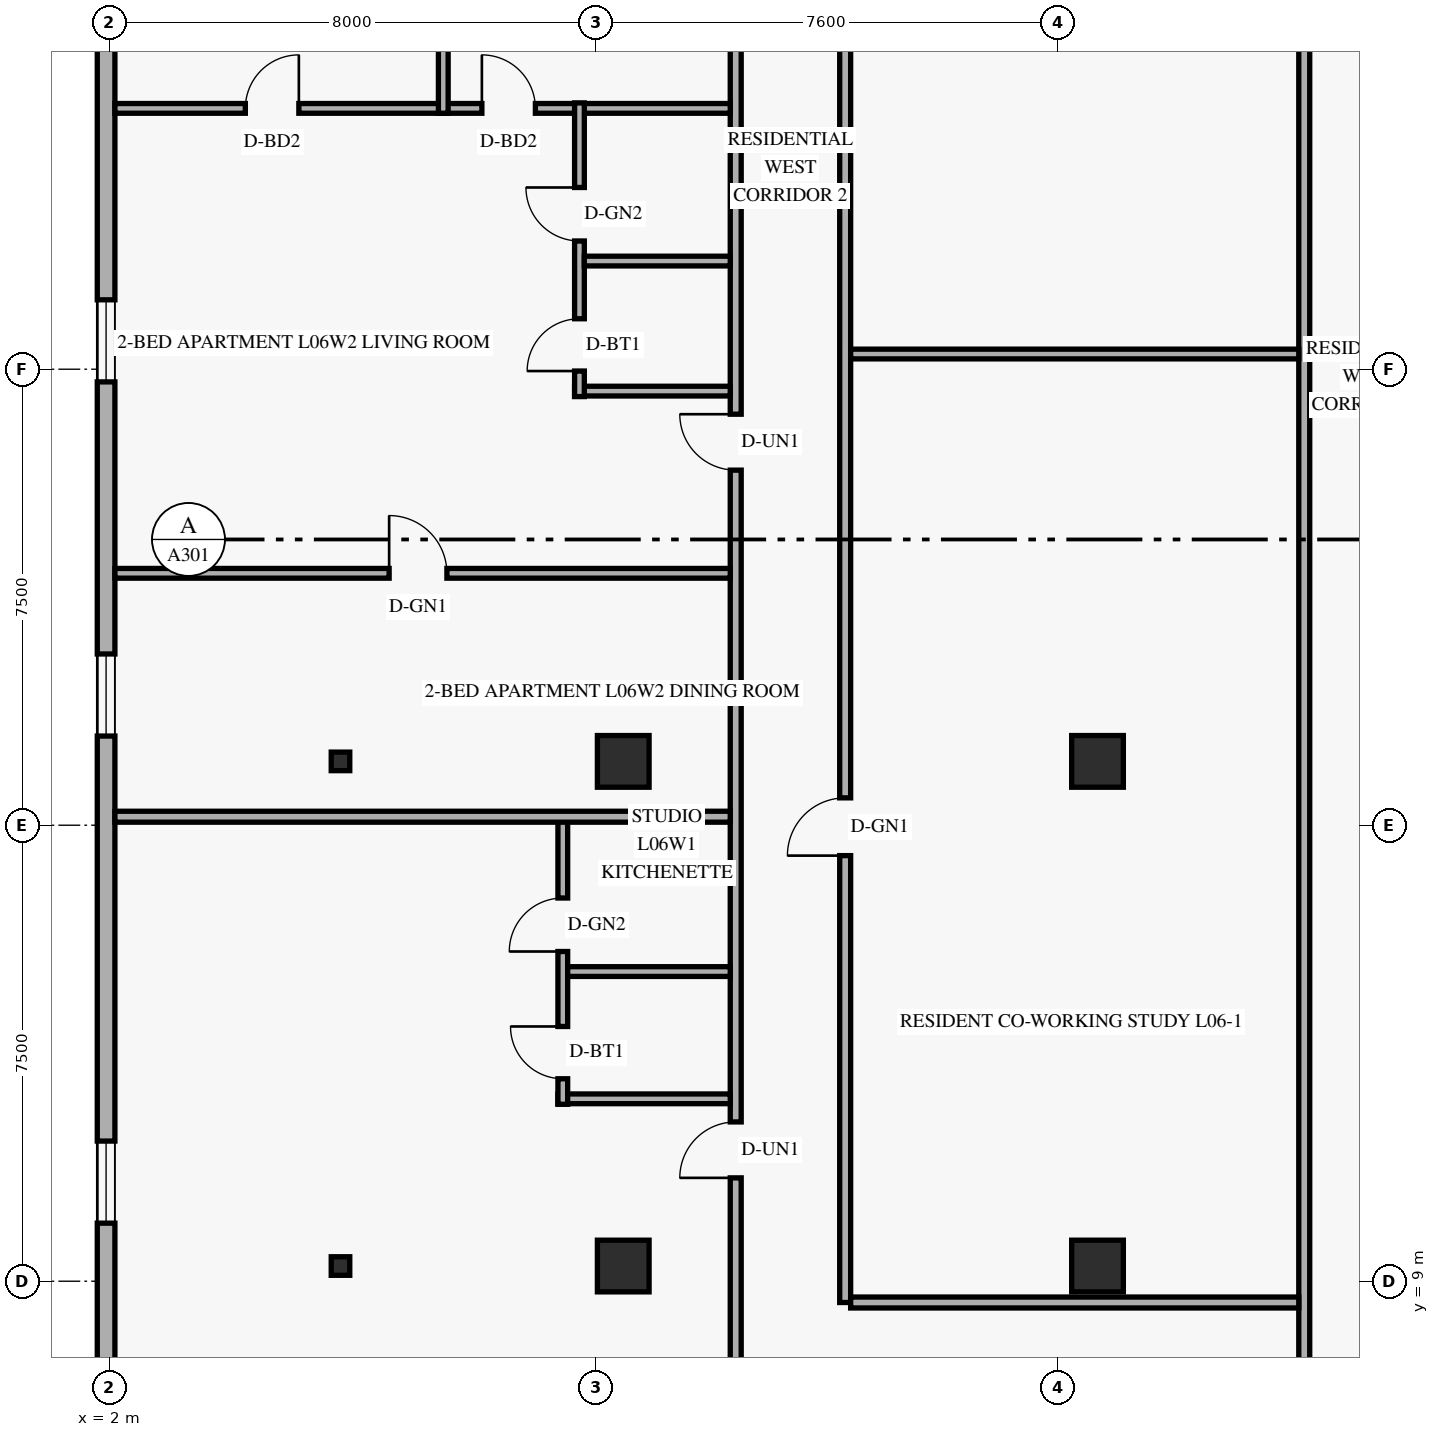
"""IFC4 building model, lengths in metres.
Left out: names, types, materials, properties, quantities, classifications, styles, units other than length and angle.
Written with IfcOpenShell. Run it as: python <this file> out.ifc"""

import sys

from ifc_helpers import new_model, si_unit, direction, frame, frame_2d, origin, origin_2d, place, context, subcontext, project, spatial, rectangle, hollow_rectangle, extrude, element, fill, save


model = new_model("IFC4")
c1 = context("Model", 3, precision=1e-05, world=origin(), true_north=direction((0.0, 1.0)))
c2 = subcontext(c1, "Body", "Model", "MODEL_VIEW")
j1 = project(units=[si_unit("LENGTHUNIT", "METRE"), si_unit("PLANEANGLEUNIT", "RADIAN")], contexts=[c1])
p1 = place(None, origin())
s1 = spatial("IfcSite", under=j1, at=p1, CompositionType="ELEMENT")
p2 = place(p1, origin())
s2 = spatial("IfcBuilding", under=s1, at=p2, CompositionType="ELEMENT")
p3 = place(p2, frame((0.0, 0.0, 27.6)))
s3 = spatial("IfcBuildingStorey", under=s2, at=p3, CompositionType="ELEMENT", Elevation=27.6)
for number, where, z_axis, x_axis in (
    (1, (5.8, 9.25, 0.0), (0.0, 0.0, 1.0), (1.0, 0.0, 0.0)),
    (2, (5.8, 17.55, 0.0), (0.0, 0.0, 1.0), (1.0, 0.0, 0.0)),
):
    element("IfcColumn", number, at=place(p3, frame(where, z_axis=z_axis, x_axis=x_axis)), inside=s3, PredefinedType="COLUMN", context=c2, shape_type="SweptSolid", body=[
        extrude(hollow_rectangle(XDim=0.305, YDim=0.305, WallThickness=0.013, at=origin_2d()), origin(), (0.0, 0.0, 1.0), 3.6),
    ])
for number, where, z_axis, x_axis in (
    (3, (10.45, 9.25, 0.0), (0.0, 0.0, 1.0), (1.0, 0.0, 0.0)),
    (4, (10.45, 17.55, 0.0), (0.0, 0.0, 1.0), (1.0, 0.0, 0.0)),
    (5, (18.25, 9.25, 0.0), (0.0, 0.0, 1.0), (1.0, 0.0, 0.0)),
    (6, (18.25, 17.55, 0.0), (0.0, 0.0, 1.0), (1.0, 0.0, 0.0)),
):
    element("IfcColumn", number, at=place(p3, frame(where, z_axis=z_axis, x_axis=x_axis)), inside=s3, PredefinedType="COLUMN", context=c2, shape_type="SweptSolid", body=[
        extrude(rectangle(XDim=0.85, YDim=0.85, at=origin_2d()), origin(), (0.0, 0.0, 1.0), 3.6),
    ])
p4 = place(p3, frame((1.945, 43.38, 0.0), z_axis=(0.0, 0.0, 1.0), x_axis=(0.0, -1.0, 0.0)))
e7 = element("IfcWall", 7, at=p4, inside=s3, PredefinedType="SOLIDWALL", context=c2, shape_type="SweptSolid", body=[
    extrude(rectangle(XDim=38.76, YDim=0.29, at=frame_2d((19.38, 0.0))), origin(), (0.0, 0.0, 1.0), 3.36),
])
p5 = place(p4, frame((32.075, 0.0, 0.85)))
e8 = element("IfcOpeningElement", 8, at=p5, cuts=e7, PredefinedType="OPENING", context=c2, shape_type="SweptSolid", body=[
    extrude(rectangle(XDim=1.35, YDim=1.55, at=frame_2d((0.675, 0.775))), frame((0.0, 0.155, 0.0), z_axis=(0.0, -1.0, 0.0), x_axis=(1.0, 0.0, 0.0)), (0.0, 0.0, 1.0), 0.31),
])
p6 = place(p4, frame((24.063, 0.0, 0.85)))
e9 = element("IfcOpeningElement", 9, at=p6, cuts=e7, PredefinedType="OPENING", context=c2, shape_type="SweptSolid", body=[
    extrude(rectangle(XDim=1.35, YDim=1.55, at=frame_2d((0.675, 0.775))), frame((0.0, 0.155, 0.0), z_axis=(0.0, -1.0, 0.0), x_axis=(1.0, 0.0, 0.0)), (0.0, 0.0, 1.0), 0.31),
])
p7 = place(p4, frame((18.238, 0.0, 0.85)))
e10 = element("IfcOpeningElement", 10, at=p7, cuts=e7, PredefinedType="OPENING", context=c2, shape_type="SweptSolid", body=[
    extrude(rectangle(XDim=1.35, YDim=1.55, at=frame_2d((0.675, 0.775))), frame((0.0, 0.155, 0.0), z_axis=(0.0, -1.0, 0.0), x_axis=(1.0, 0.0, 0.0)), (0.0, 0.0, 1.0), 0.31),
])
p8 = place(p4, frame((12.42, 0.0, 0.85)))
e11 = element("IfcOpeningElement", 11, at=p8, cuts=e7, PredefinedType="OPENING", context=c2, shape_type="SweptSolid", body=[
    extrude(rectangle(XDim=1.35, YDim=1.55, at=frame_2d((0.675, 0.775))), frame((0.0, 0.155, 0.0), z_axis=(0.0, -1.0, 0.0), x_axis=(1.0, 0.0, 0.0)), (0.0, 0.0, 1.0), 0.31),
])
p9 = place(p4, frame((8.79, 0.0, 0.85)))
e12 = element("IfcOpeningElement", 12, at=p9, cuts=e7, PredefinedType="OPENING", context=c2, shape_type="SweptSolid", body=[
    extrude(rectangle(XDim=1.35, YDim=1.55, at=frame_2d((0.675, 0.775))), frame((0.0, 0.155, 0.0), z_axis=(0.0, -1.0, 0.0), x_axis=(1.0, 0.0, 0.0)), (0.0, 0.0, 1.0), 0.31),
])
p10 = place(p4, frame((3.24, 0.0, 0.85)))
e13 = element("IfcOpeningElement", 13, at=p10, cuts=e7, PredefinedType="OPENING", context=c2, shape_type="SweptSolid", body=[
    extrude(rectangle(XDim=1.35, YDim=1.55, at=frame_2d((0.675, 0.775))), frame((0.0, 0.155, 0.0), z_axis=(0.0, -1.0, 0.0), x_axis=(1.0, 0.0, 0.0)), (0.0, 0.0, 1.0), 0.31),
])
p11 = place(p3, frame((21.65, 6.8, 0.0), z_axis=(0.0, 0.0, 1.0), x_axis=(0.0, 1.0, 0.0)))
e14 = element("IfcWall", 14, at=p11, inside=s3, PredefinedType="STANDARD", context=c2, shape_type="SweptSolid", body=[
    extrude(rectangle(XDim=34.4, YDim=0.18, at=frame_2d((17.2, 0.0))), origin(), (0.0, 0.0, 1.0), 2.649),
])
p12 = place(p3, frame((12.3, 1.29, 0.0), z_axis=(0.0, 0.0, 1.0), x_axis=(0.0, 1.0, 0.0)))
e15 = element("IfcWall", 15, at=p12, inside=s3, PredefinedType="STANDARD", context=c2, shape_type="SweptSolid", body=[
    extrude(rectangle(XDim=45.42, YDim=0.18, at=frame_2d((22.71, 0.0))), origin(), (0.0, 0.0, 1.0), 2.649),
])
p13 = place(p12, frame((9.41, 0.0, 0.0)))
e16 = element("IfcOpeningElement", 16, at=p13, cuts=e15, PredefinedType="OPENING", context=c2, shape_type="SweptSolid", body=[
    extrude(rectangle(XDim=0.92, YDim=2.15, at=frame_2d((0.46, 1.075))), frame((0.0, 0.1, 0.0), z_axis=(0.0, -1.0, 0.0), x_axis=(1.0, 0.0, 0.0)), (0.0, 0.0, 1.0), 0.2),
])
p14 = place(p12, frame((21.05, 0.0, 0.0)))
e17 = element("IfcOpeningElement", 17, at=p14, cuts=e15, PredefinedType="OPENING", context=c2, shape_type="SweptSolid", body=[
    extrude(rectangle(XDim=0.92, YDim=2.15, at=frame_2d((0.46, 1.075))), frame((0.0, 0.1, 0.0), z_axis=(0.0, -1.0, 0.0), x_axis=(1.0, 0.0, 0.0)), (0.0, 0.0, 1.0), 0.2),
])
p15 = place(p12, frame((36.491, 0.0, 0.0)))
e18 = element("IfcOpeningElement", 18, at=p15, cuts=e15, PredefinedType="OPENING", context=c2, shape_type="SweptSolid", body=[
    extrude(rectangle(XDim=0.92, YDim=2.15, at=frame_2d((0.46, 1.075))), frame((0.0, 0.1, 0.0), z_axis=(0.0, -1.0, 0.0), x_axis=(1.0, 0.0, 0.0)), (0.0, 0.0, 1.0), 0.2),
])
p16 = place(p3, frame((14.1, 8.65, 0.0), z_axis=(0.0, 0.0, 1.0), x_axis=(0.0, 1.0, 0.0)))
e19 = element("IfcWall", 19, at=p16, inside=s3, PredefinedType="STANDARD", context=c2, shape_type="SweptSolid", body=[
    extrude(rectangle(XDim=30.7, YDim=0.18, at=frame_2d((15.35, 0.0))), origin(), (0.0, 0.0, 1.0), 2.649),
])
p17 = place(p16, frame((7.35, 0.0, 0.0)))
e20 = element("IfcOpeningElement", 20, at=p17, cuts=e19, PredefinedType="OPENING", context=c2, shape_type="SweptSolid", body=[
    extrude(rectangle(XDim=0.95, YDim=2.15, at=frame_2d((0.475, 1.075))), frame((0.0, 0.1, 0.0), z_axis=(0.0, -1.0, 0.0), x_axis=(1.0, 0.0, 0.0)), (0.0, 0.0, 1.0), 0.2),
])
p18 = place(p16, frame((22.7, 0.0, 0.0)))
e21 = element("IfcOpeningElement", 21, at=p18, cuts=e19, PredefinedType="OPENING", context=c2, shape_type="SweptSolid", body=[
    extrude(rectangle(XDim=0.95, YDim=2.15, at=frame_2d((0.475, 1.075))), frame((0.0, 0.1, 0.0), z_axis=(0.0, -1.0, 0.0), x_axis=(1.0, 0.0, 0.0)), (0.0, 0.0, 1.0), 0.2),
])
p19 = place(p3, frame((14.19, 8.65, 0.0), z_axis=(0.0, 0.0, 1.0), x_axis=(1.0, 0.0, 0.0)))
e22 = element("IfcWall", 22, at=p19, inside=s3, PredefinedType="STANDARD", context=c2, shape_type="SweptSolid", body=[
    extrude(rectangle(XDim=7.37, YDim=0.18, at=frame_2d((3.685, 0.0))), origin(), (0.0, 0.0, 1.0), 2.649),
])
p20 = place(p3, frame((9.376, 12.0, 0.0), z_axis=(0.0, 0.0, 1.0), x_axis=(1.0, 0.0, 0.0)))
e23 = element("IfcWall", 23, at=p20, inside=s3, PredefinedType="PLUMBINGWALL", context=c2, shape_type="SweptSolid", body=[
    extrude(rectangle(XDim=2.834, YDim=0.16, at=frame_2d((1.417, 0.0))), origin(), (0.0, 0.0, 1.0), 2.649),
])
p21 = place(p3, frame((9.456, 11.91, 0.0), z_axis=(0.0, 0.0, 1.0), x_axis=(0.0, 1.0, 0.0)))
e24 = element("IfcWall", 24, at=p21, inside=s3, PredefinedType="PLUMBINGWALL", context=c2, shape_type="SweptSolid", body=[
    extrude(rectangle(XDim=4.73, YDim=0.16, at=frame_2d((2.365, 0.0))), origin(), (0.0, 0.0, 1.0), 2.932),
])
p22 = place(p21, frame((0.42, 0.0, 0.0)))
e25 = element("IfcOpeningElement", 25, at=p22, cuts=e24, PredefinedType="OPENING", context=c2, shape_type="SweptSolid", body=[
    extrude(rectangle(XDim=0.86, YDim=2.12, at=frame_2d((0.43, 1.06))), frame((0.0, 0.09, 0.0), z_axis=(0.0, -1.0, 0.0), x_axis=(1.0, 0.0, 0.0)), (0.0, 0.0, 1.0), 0.18),
])
p23 = place(p21, frame((2.513, 0.0, 0.0)))
e26 = element("IfcOpeningElement", 26, at=p23, cuts=e24, PredefinedType="OPENING", context=c2, shape_type="SweptSolid", body=[
    extrude(rectangle(XDim=0.88, YDim=2.12, at=frame_2d((0.44, 1.06))), frame((0.0, 0.09, 0.0), z_axis=(0.0, -1.0, 0.0), x_axis=(1.0, 0.0, 0.0)), (0.0, 0.0, 1.0), 0.18),
])
p24 = place(p3, frame((9.536, 14.093, 0.0), z_axis=(0.0, 0.0, 1.0), x_axis=(1.0, 0.0, 0.0)))
e27 = element("IfcWall", 27, at=p24, inside=s3, PredefinedType="PLUMBINGWALL", context=c2, shape_type="SweptSolid", body=[
    extrude(rectangle(XDim=2.674, YDim=0.16, at=frame_2d((1.337, 0.0))), origin(), (0.0, 0.0, 1.0), 2.649),
])
p25 = place(p3, frame((2.09, 16.64, 0.0), z_axis=(0.0, 0.0, 1.0), x_axis=(1.0, 0.0, 0.0)))
e28 = element("IfcWall", 28, at=p25, inside=s3, PredefinedType="PARTITIONING", context=c2, shape_type="SweptSolid", body=[
    extrude(rectangle(XDim=10.12, YDim=0.18, at=frame_2d((5.06, 0.0))), origin(), (0.0, 0.0, 1.0), 2.649),
])
p26 = place(p3, frame((2.09, 28.29, 0.0), z_axis=(0.0, 0.0, 1.0), x_axis=(1.0, 0.0, 0.0)))
e29 = element("IfcWall", 29, at=p26, inside=s3, PredefinedType="PARTITIONING", context=c2, shape_type="SweptSolid", body=[
    extrude(rectangle(XDim=10.12, YDim=0.16, at=frame_2d((5.06, 0.0))), origin(), (0.0, 0.0, 1.0), 2.649),
])
p27 = place(p26, frame((2.145, 0.0, 0.0)))
e30 = element("IfcOpeningElement", 30, at=p27, cuts=e29, PredefinedType="OPENING", context=c2, shape_type="SweptSolid", body=[
    extrude(rectangle(XDim=0.88, YDim=2.14, at=frame_2d((0.44, 1.07))), frame((0.0, 0.09, 0.0), z_axis=(0.0, -1.0, 0.0), x_axis=(1.0, 0.0, 0.0)), (0.0, 0.0, 1.0), 0.18),
])
p28 = place(p26, frame((6.035, 0.0, 0.0)))
e31 = element("IfcOpeningElement", 31, at=p28, cuts=e29, PredefinedType="OPENING", context=c2, shape_type="SweptSolid", body=[
    extrude(rectangle(XDim=0.88, YDim=2.14, at=frame_2d((0.44, 1.07))), frame((0.0, 0.09, 0.0), z_axis=(0.0, -1.0, 0.0), x_axis=(1.0, 0.0, 0.0)), (0.0, 0.0, 1.0), 0.18),
])
p29 = place(p3, frame((9.65, 23.64, 0.0), z_axis=(0.0, 0.0, 1.0), x_axis=(1.0, 0.0, 0.0)))
e32 = element("IfcWall", 32, at=p29, inside=s3, PredefinedType="PLUMBINGWALL", context=c2, shape_type="SweptSolid", body=[
    extrude(rectangle(XDim=2.56, YDim=0.16, at=frame_2d((1.28, 0.0))), origin(), (0.0, 0.0, 1.0), 2.649),
])
p30 = place(p3, frame((9.73, 23.55, 0.0), z_axis=(0.0, 0.0, 1.0), x_axis=(0.0, 1.0, 0.0)))
e33 = element("IfcWall", 33, at=p30, inside=s3, PredefinedType="PLUMBINGWALL", context=c2, shape_type="SweptSolid", body=[
    extrude(rectangle(XDim=4.83, YDim=0.16, at=frame_2d((2.415, 0.0))), origin(), (0.0, 0.0, 1.0), 2.932),
])
p31 = place(p30, frame((0.42, 0.0, 0.0)))
e34 = element("IfcOpeningElement", 34, at=p31, cuts=e33, PredefinedType="OPENING", context=c2, shape_type="SweptSolid", body=[
    extrude(rectangle(XDim=0.86, YDim=2.12, at=frame_2d((0.43, 1.06))), frame((0.0, 0.09, 0.0), z_axis=(0.0, -1.0, 0.0), x_axis=(1.0, 0.0, 0.0)), (0.0, 0.0, 1.0), 0.18),
])
p32 = place(p30, frame((2.559, 0.0, 0.0)))
e35 = element("IfcOpeningElement", 35, at=p32, cuts=e33, PredefinedType="OPENING", context=c2, shape_type="SweptSolid", body=[
    extrude(rectangle(XDim=0.88, YDim=2.12, at=frame_2d((0.44, 1.06))), frame((0.0, 0.09, 0.0), z_axis=(0.0, -1.0, 0.0), x_axis=(1.0, 0.0, 0.0)), (0.0, 0.0, 1.0), 0.18),
])
p33 = place(p3, frame((9.81, 25.779, 0.0), z_axis=(0.0, 0.0, 1.0), x_axis=(1.0, 0.0, 0.0)))
e36 = element("IfcWall", 36, at=p33, inside=s3, PredefinedType="PLUMBINGWALL", context=c2, shape_type="SweptSolid", body=[
    extrude(rectangle(XDim=2.4, YDim=0.16, at=frame_2d((1.2, 0.0))), origin(), (0.0, 0.0, 1.0), 2.649),
])
p34 = place(p3, frame((2.09, 20.643, 0.0), z_axis=(0.0, 0.0, 1.0), x_axis=(1.0, 0.0, 0.0)))
e37 = element("IfcWall", 37, at=p34, inside=s3, PredefinedType="PARTITIONING", context=c2, shape_type="SweptSolid", body=[
    extrude(rectangle(XDim=10.12, YDim=0.16, at=frame_2d((5.06, 0.0))), origin(), (0.0, 0.0, 1.0), 2.649),
])
p35 = place(p34, frame((4.51, 0.0, 0.0)))
e38 = element("IfcOpeningElement", 38, at=p35, cuts=e37, PredefinedType="OPENING", context=c2, shape_type="SweptSolid", body=[
    extrude(rectangle(XDim=0.95, YDim=2.15, at=frame_2d((0.475, 1.075))), frame((0.0, 0.09, 0.0), z_axis=(0.0, -1.0, 0.0), x_axis=(1.0, 0.0, 0.0)), (0.0, 0.0, 1.0), 0.18),
])
p36 = place(p3, frame((7.49, 28.21, 0.0), z_axis=(0.0, 0.0, 1.0), x_axis=(0.0, 1.0, 0.0)))
e39 = element("IfcWall", 39, at=p36, inside=s3, PredefinedType="PARTITIONING", context=c2, shape_type="SweptSolid", body=[
    extrude(rectangle(XDim=4.46, YDim=0.16, at=frame_2d((2.23, 0.0))), origin(), (0.0, 0.0, 1.0), 2.649),
])
p37 = place(p3, frame((14.19, 24.25, 0.0), z_axis=(0.0, 0.0, 1.0), x_axis=(1.0, 0.0, 0.0)))
e40 = element("IfcWall", 40, at=p37, inside=s3, PredefinedType="PARTITIONING", context=c2, shape_type="SweptSolid", body=[
    extrude(rectangle(XDim=7.37, YDim=0.16, at=frame_2d((3.685, 0.0))), origin(), (0.0, 0.0, 1.0), 2.649),
])
p38 = place(p5, origin())
e41 = element("IfcWindow", 41, at=p38, inside=s3, PartitioningType="SINGLE_PANEL", PredefinedType="WINDOW", context=c2, shape_type="SweptSolid", body=[
    extrude(rectangle(XDim=1.35, YDim=1.55, at=frame_2d((0.675, 0.775))), frame((0.0, 0.03, 0.0), z_axis=(0.0, -1.0, 0.0), x_axis=(1.0, 0.0, 0.0)), (0.0, 0.0, 1.0), 0.06),
])
fill(e8, e41)
p39 = place(p6, origin())
e42 = element("IfcWindow", 42, at=p39, inside=s3, PartitioningType="SINGLE_PANEL", PredefinedType="WINDOW", context=c2, shape_type="SweptSolid", body=[
    extrude(rectangle(XDim=1.35, YDim=1.55, at=frame_2d((0.675, 0.775))), frame((0.0, 0.03, 0.0), z_axis=(0.0, -1.0, 0.0), x_axis=(1.0, 0.0, 0.0)), (0.0, 0.0, 1.0), 0.06),
])
fill(e9, e42)
p40 = place(p7, origin())
e43 = element("IfcWindow", 43, at=p40, inside=s3, PartitioningType="SINGLE_PANEL", PredefinedType="WINDOW", context=c2, shape_type="SweptSolid", body=[
    extrude(rectangle(XDim=1.35, YDim=1.55, at=frame_2d((0.675, 0.775))), frame((0.0, 0.03, 0.0), z_axis=(0.0, -1.0, 0.0), x_axis=(1.0, 0.0, 0.0)), (0.0, 0.0, 1.0), 0.06),
])
fill(e10, e43)
p41 = place(p13, origin())
e44 = element("IfcDoor", 44, at=p41, inside=s3, OperationType="SINGLE_SWING_LEFT", PredefinedType="DOOR", context=c2, shape_type="SweptSolid", body=[
    extrude(rectangle(XDim=0.92, YDim=2.15, at=frame_2d((0.46, 1.075))), frame((0.0, 0.025, 0.0), z_axis=(0.0, -1.0, 0.0), x_axis=(1.0, 0.0, 0.0)), (0.0, 0.0, 1.0), 0.05),
])
fill(e16, e44)
p42 = place(p22, origin())
e45 = element("IfcDoor", 45, at=p42, inside=s3, OperationType="SINGLE_SWING_RIGHT", PredefinedType="DOOR", context=c2, shape_type="SweptSolid", body=[
    extrude(rectangle(XDim=0.86, YDim=2.12, at=frame_2d((0.43, 1.06))), frame((0.0, 0.025, 0.0), z_axis=(0.0, -1.0, 0.0), x_axis=(1.0, 0.0, 0.0)), (0.0, 0.0, 1.0), 0.05),
])
fill(e25, e45)
p43 = place(p23, origin())
e46 = element("IfcDoor", 46, at=p43, inside=s3, OperationType="SINGLE_SWING_LEFT", PredefinedType="DOOR", context=c2, shape_type="SweptSolid", body=[
    extrude(rectangle(XDim=0.88, YDim=2.12, at=frame_2d((0.44, 1.06))), frame((0.0, 0.025, 0.0), z_axis=(0.0, -1.0, 0.0), x_axis=(1.0, 0.0, 0.0)), (0.0, 0.0, 1.0), 0.05),
])
fill(e26, e46)
p44 = place(p35, origin())
e47 = element("IfcDoor", 47, at=p44, inside=s3, OperationType="SINGLE_SWING_LEFT", PredefinedType="DOOR", context=c2, shape_type="SweptSolid", body=[
    extrude(rectangle(XDim=0.95, YDim=2.15, at=frame_2d((0.475, 1.075))), frame((0.0, 0.025, 0.0), z_axis=(0.0, -1.0, 0.0), x_axis=(1.0, 0.0, 0.0)), (0.0, 0.0, 1.0), 0.05),
])
fill(e38, e47)
p45 = place(p14, origin())
e48 = element("IfcDoor", 48, at=p45, inside=s3, OperationType="SINGLE_SWING_RIGHT", PredefinedType="DOOR", context=c2, shape_type="SweptSolid", body=[
    extrude(rectangle(XDim=0.92, YDim=2.15, at=frame_2d((0.46, 1.075))), frame((0.0, 0.025, 0.0), z_axis=(0.0, -1.0, 0.0), x_axis=(1.0, 0.0, 0.0)), (0.0, 0.0, 1.0), 0.05),
])
fill(e17, e48)
p46 = place(p31, origin())
e49 = element("IfcDoor", 49, at=p46, inside=s3, OperationType="SINGLE_SWING_LEFT", PredefinedType="DOOR", context=c2, shape_type="SweptSolid", body=[
    extrude(rectangle(XDim=0.86, YDim=2.12, at=frame_2d((0.43, 1.06))), frame((0.0, 0.025, 0.0), z_axis=(0.0, -1.0, 0.0), x_axis=(1.0, 0.0, 0.0)), (0.0, 0.0, 1.0), 0.05),
])
fill(e34, e49)
p47 = place(p32, origin())
e50 = element("IfcDoor", 50, at=p47, inside=s3, OperationType="SINGLE_SWING_RIGHT", PredefinedType="DOOR", context=c2, shape_type="SweptSolid", body=[
    extrude(rectangle(XDim=0.88, YDim=2.12, at=frame_2d((0.44, 1.06))), frame((0.0, 0.025, 0.0), z_axis=(0.0, -1.0, 0.0), x_axis=(1.0, 0.0, 0.0)), (0.0, 0.0, 1.0), 0.05),
])
fill(e35, e50)
p48 = place(p27, origin())
e51 = element("IfcDoor", 51, at=p48, inside=s3, OperationType="SINGLE_SWING_RIGHT", PredefinedType="DOOR", context=c2, shape_type="SweptSolid", body=[
    extrude(rectangle(XDim=0.88, YDim=2.14, at=frame_2d((0.44, 1.07))), frame((0.0, 0.025, 0.0), z_axis=(0.0, -1.0, 0.0), x_axis=(1.0, 0.0, 0.0)), (0.0, 0.0, 1.0), 0.05),
])
fill(e30, e51)
p49 = place(p28, origin())
e52 = element("IfcDoor", 52, at=p49, inside=s3, OperationType="SINGLE_SWING_LEFT", PredefinedType="DOOR", context=c2, shape_type="SweptSolid", body=[
    extrude(rectangle(XDim=0.88, YDim=2.14, at=frame_2d((0.44, 1.07))), frame((0.0, 0.025, 0.0), z_axis=(0.0, -1.0, 0.0), x_axis=(1.0, 0.0, 0.0)), (0.0, 0.0, 1.0), 0.05),
])
fill(e31, e52)
p50 = place(p17, origin())
e53 = element("IfcDoor", 53, at=p50, inside=s3, OperationType="SINGLE_SWING_LEFT", PredefinedType="DOOR", context=c2, shape_type="SweptSolid", body=[
    extrude(rectangle(XDim=0.95, YDim=2.15, at=frame_2d((0.475, 1.075))), frame((0.0, 0.025, 0.0), z_axis=(0.0, -1.0, 0.0), x_axis=(1.0, 0.0, 0.0)), (0.0, 0.0, 1.0), 0.05),
])
fill(e20, e53)
save(model, sys.argv[1])
